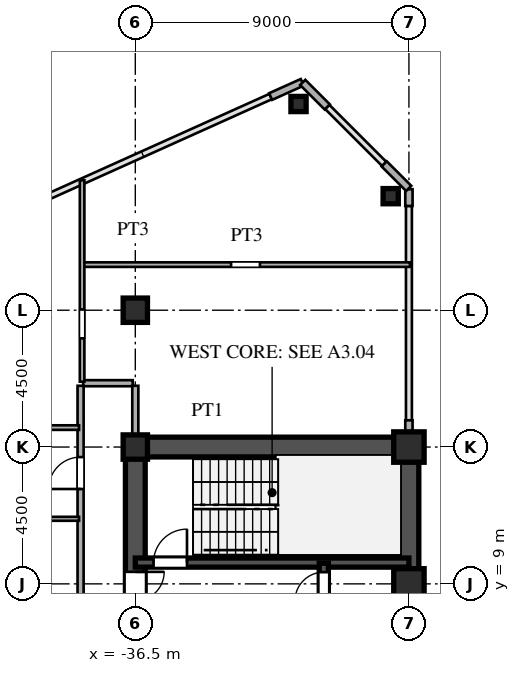
"""IFC4 building model, lengths in metres.
Left out: names, types, materials, properties, quantities, classifications, styles, units other than length and angle.
Written with IfcOpenShell. Run it as: python <this file> out.ifc"""

import sys

from ifc_helpers import new_model, si_unit, direction, frame, frame_2d, origin, origin_2d, place, context, subcontext, project, spatial, rectangle, hollow_rectangle, i_section, extrude, source, transform, mapped, element, fill, save


model = new_model("IFC4")
c1 = context("Model", 3, precision=1e-05, world=origin(), true_north=direction((0.0, 1.0)))
c2 = subcontext(c1, "Body", "Model", "MODEL_VIEW")
j1 = project(units=[si_unit("LENGTHUNIT", "METRE"), si_unit("PLANEANGLEUNIT", "RADIAN")], contexts=[c1])
p1 = place(None, origin())
s1 = spatial("IfcSite", under=j1, at=p1, CompositionType="ELEMENT")
p2 = place(p1, origin())
s2 = spatial("IfcBuilding", under=s1, at=p2, CompositionType="ELEMENT")
p3 = place(p2, frame((0.0, 0.0, 96.0)))
s3 = spatial("IfcBuildingStorey", under=s2, at=p3, CompositionType="ELEMENT", Elevation=96.0)
m1 = source(origin(), c2, "Body", "SweptSolid", [
    extrude(hollow_rectangle(XDim=1.0, YDim=1.0, WallThickness=0.042, at=origin_2d()), origin(), (0.0, 0.0, 1.0), 3.6),
])
for number, where, z_axis, x_axis in (
    (1, (-27.5, 9.0, 0.0), (0.0, 0.0, 1.0), (1.0, 0.0, 0.0)),
    (2, (-27.5, 13.5, 0.0), (0.0, 0.0, 1.0), (1.0, 0.0, 0.0)),
):
    element("IfcColumn", number, at=place(p3, frame(where, z_axis=z_axis, x_axis=x_axis)), inside=s3, PredefinedType="COLUMN", context=c2, shape_type="MappedRepresentation", body=[
        mapped(m1, transform((0.0, 0.0, 0.0), scale=1.0)),
    ])
m2 = source(origin(), c2, "Body", "SweptSolid", [
    extrude(i_section(OverallWidth=0.8, OverallDepth=0.8, WebThickness=0.032, FlangeThickness=0.05, at=origin_2d()), origin(), (0.0, 0.0, 1.0), 3.6),
])
for number, where, z_axis, x_axis in (
    (3, (-36.5, 13.5, 0.0), (0.0, 0.0, 1.0), (1.0, 0.0, 0.0)),
    (4, (-36.5, 18.0, 0.0), (0.0, 0.0, 1.0), (1.0, 0.0, 0.0)),
):
    element("IfcColumn", number, at=place(p3, frame(where, z_axis=z_axis, x_axis=x_axis)), inside=s3, PredefinedType="COLUMN", context=c2, shape_type="MappedRepresentation", body=[
        mapped(m2, transform((0.0, 0.0, 0.0), scale=1.0)),
    ])
m3 = source(origin(), c2, "Body", "SweptSolid", [
    extrude(hollow_rectangle(XDim=0.5, YDim=0.5, WallThickness=0.02, at=origin_2d()), origin(), (0.0, 0.0, 1.0), 3.6),
])
for number, where, z_axis, x_axis in (
    (5, (-28.1, 21.751, 0.0), (0.0, 0.0, 1.0), (1.0, 0.0, 0.0)),
    (6, (-31.131, 24.783, 0.0), (0.0, 0.0, 1.0), (1.0, 0.0, 0.0)),
):
    element("IfcColumn", number, at=place(p3, frame(where, z_axis=z_axis, x_axis=x_axis)), inside=s3, PredefinedType="COLUMN", context=c2, shape_type="MappedRepresentation", body=[
        mapped(m3, transform((0.0, 0.0, 0.0), scale=1.0)),
    ])
p4 = place(p3, frame((-27.5, 13.83, 0.0), z_axis=(0.0, 0.0, 1.0), x_axis=(0.0, 1.0, 0.0)))
e7 = element("IfcWall", 7, at=p4, inside=s3, PredefinedType="SOLIDWALL", context=c2, shape_type="SweptSolid", body=[
    extrude(rectangle(XDim=0.55, YDim=0.24, at=frame_2d((0.275, 0.0))), origin(), (0.0, 0.0, 1.0), 2.88),
])
p5 = place(p3, frame((-27.5, 21.43, 0.0), z_axis=(0.0, 0.0, 1.0), x_axis=(0.0, 1.0, 0.0)))
e8 = element("IfcWall", 8, at=p5, inside=s3, PredefinedType="SOLIDWALL", context=c2, shape_type="SweptSolid", body=[
    extrude(rectangle(XDim=0.55, YDim=0.24, at=frame_2d((0.275, 0.0))), origin(), (0.0, 0.0, 1.0), 3.38),
])
for number, where, z_axis, x_axis in (
    (9, (-27.507, 22.007, 0.0), (0.0, 0.0, 1.0), (-0.707, 0.707, 0.0)),
    (10, (-30.187, 24.687, 0.0), (0.0, 0.0, 1.0), (-0.707, 0.707, 0.0)),
):
    element("IfcWall", number, at=place(p3, frame(where, z_axis=z_axis, x_axis=x_axis)), inside=s3, PredefinedType="SOLIDWALL", context=c2, shape_type="SweptSolid", body=[
        extrude(rectangle(XDim=1.14, YDim=0.24, at=frame_2d((0.57, 0.0))), origin(), (0.0, 0.0, 1.0), 3.38),
    ])
p6 = place(p3, frame((-31.009, 25.496, 0.0), z_axis=(0.0, 0.0, 1.0), x_axis=(-0.911929519623, -0.410346866979, 0.0)))
e11 = element("IfcWall", 11, at=p6, inside=s3, PredefinedType="SOLIDWALL", context=c2, shape_type="SweptSolid", body=[
    extrude(rectangle(XDim=1.14, YDim=0.24, at=frame_2d((0.57, 0.0))), origin(), (0.0, 0.0, 1.0), 3.38),
])
p7 = place(p3, frame((-27.5, 1.3, 0.0), z_axis=(0.0, 0.0, 1.0), x_axis=(0.0, 1.0, 0.0)))
e12 = element("IfcWall", 12, at=p7, inside=s3, PredefinedType="SHEAR", context=c2, shape_type="SweptSolid", body=[
    extrude(rectangle(XDim=12.2, YDim=0.65, at=frame_2d((6.1, 0.0))), origin(), (0.0, 0.0, 1.0), 3.38),
])
p8 = place(p3, frame((-36.5, 13.5, 0.0), z_axis=(0.0, 0.0, 1.0), x_axis=(1.0, 0.0, 0.0)))
e13 = element("IfcWall", 13, at=p8, inside=s3, PredefinedType="SHEAR", context=c2, shape_type="SweptSolid", body=[
    extrude(rectangle(XDim=9.0, YDim=0.65, at=frame_2d((4.5, 0.0))), origin(), (0.0, 0.0, 1.0), 3.38),
])
p9 = place(p3, frame((-36.5, 8.2, 0.0), z_axis=(0.0, 0.0, 1.0), x_axis=(0.0, 1.0, 0.0)))
e14 = element("IfcWall", 14, at=p9, inside=s3, PredefinedType="SHEAR", context=c2, shape_type="SweptSolid", body=[
    extrude(rectangle(XDim=5.45, YDim=0.65, at=frame_2d((2.725, 0.0))), origin(), (0.0, 0.0, 1.0), 3.38),
])
p10 = place(p9, frame((0.245, 0.0, 0.0)))
e15 = element("IfcOpeningElement", 15, at=p10, cuts=e14, PredefinedType="OPENING", context=c2, shape_type="SweptSolid", body=[
    extrude(rectangle(XDim=0.95, YDim=2.15, at=frame_2d((0.475, 1.075))), frame((0.0, 0.335, 0.0), z_axis=(0.0, -1.0, 0.0), x_axis=(1.0, 0.0, 0.0)), (0.0, 0.0, 1.0), 0.67),
])
p11 = place(p3, frame((-36.5, 9.7, 0.0), z_axis=(0.0, 0.0, 1.0), x_axis=(1.0, 0.0, 0.0)))
e16 = element("IfcWall", 16, at=p11, inside=s3, PredefinedType="SHEAR", context=c2, shape_type="SweptSolid", body=[
    extrude(rectangle(XDim=9.0, YDim=0.3, at=frame_2d((4.5, 0.0))), origin(), (0.0, 0.0, 1.0), 3.38),
])
p12 = place(p11, frame((0.6, 0.0, 0.0)))
e17 = element("IfcOpeningElement", 17, at=p12, cuts=e16, PredefinedType="OPENING", context=c2, shape_type="SweptSolid", body=[
    extrude(rectangle(XDim=1.1, YDim=2.2, at=frame_2d((0.55, 1.1))), frame((0.0, 0.16, 0.0), z_axis=(0.0, -1.0, 0.0), x_axis=(1.0, 0.0, 0.0)), (0.0, 0.0, 1.0), 0.32),
])
p13 = place(p3, frame((-30.3, 8.15, 0.0), z_axis=(0.0, 0.0, 1.0), x_axis=(0.0, 1.0, 0.0)))
e18 = element("IfcWall", 18, at=p13, inside=s3, PredefinedType="SHEAR", context=c2, shape_type="SweptSolid", body=[
    extrude(rectangle(XDim=1.53, YDim=0.3, at=frame_2d((0.765, 0.0))), origin(), (0.0, 0.0, 1.0), 3.38),
])
p14 = place(p13, frame((0.285, 0.0, 0.0)))
e19 = element("IfcOpeningElement", 19, at=p14, cuts=e18, PredefinedType="OPENING", context=c2, shape_type="SweptSolid", body=[
    extrude(rectangle(XDim=0.95, YDim=2.15, at=frame_2d((0.475, 1.075))), frame((0.0, 0.16, 0.0), z_axis=(0.0, -1.0, 0.0), x_axis=(1.0, 0.0, 0.0)), (0.0, 0.0, 1.0), 0.32),
])
p15 = place(p3, frame((-44.1, 11.14, 0.0), z_axis=(0.0, 0.0, 1.0), x_axis=(1.0, 0.0, 0.0)))
e20 = element("IfcWall", 20, at=p15, inside=s3, PredefinedType="PARTITIONING", context=c2, shape_type="SweptSolid", body=[
    extrude(rectangle(XDim=5.75, YDim=0.13, at=frame_2d((2.875, 0.0))), origin(), (0.0, 0.0, 1.0), 3.38),
])
p16 = place(p15, frame((2.435, 0.0, 0.0)))
e21 = element("IfcOpeningElement", 21, at=p16, cuts=e20, PredefinedType="OPENING", context=c2, shape_type="SweptSolid", body=[
    extrude(rectangle(XDim=0.88, YDim=2.1, at=frame_2d((0.44, 1.05))), frame((0.0, 0.075, 0.0), z_axis=(0.0, -1.0, 0.0), x_axis=(1.0, 0.0, 0.0)), (0.0, 0.0, 1.0), 0.15),
])
p17 = place(p3, frame((-44.1, 14.14, 0.0), z_axis=(0.0, 0.0, 1.0), x_axis=(1.0, 0.0, 0.0)))
e22 = element("IfcWall", 22, at=p17, inside=s3, PredefinedType="PARTITIONING", context=c2, shape_type="SweptSolid", body=[
    extrude(rectangle(XDim=5.75, YDim=0.15, at=frame_2d((2.875, 0.0))), origin(), (0.0, 0.0, 1.0), 3.38),
])
p18 = place(p17, frame((2.4, 0.0, 0.0)))
e23 = element("IfcOpeningElement", 23, at=p18, cuts=e22, PredefinedType="OPENING", context=c2, shape_type="SweptSolid", body=[
    extrude(rectangle(XDim=0.95, YDim=2.15, at=frame_2d((0.475, 1.075))), frame((0.0, 0.085, 0.0), z_axis=(0.0, -1.0, 0.0), x_axis=(1.0, 0.0, 0.0)), (0.0, 0.0, 1.0), 0.17),
])
p19 = place(p3, frame((-38.215, 15.6, 0.0), z_axis=(0.0, 0.0, 1.0), x_axis=(1.0, 0.0, 0.0)))
e24 = element("IfcWall", 24, at=p19, inside=s3, PredefinedType="PARTITIONING", context=c2, shape_type="SweptSolid", body=[
    extrude(rectangle(XDim=1.63, YDim=0.2, at=frame_2d((0.815, 0.0))), origin(), (0.0, 0.0, 1.0), 3.38),
])
p20 = place(p3, frame((-38.2, 19.5, 0.0), z_axis=(0.0, 0.0, 1.0), x_axis=(1.0, 0.0, 0.0)))
e25 = element("IfcWall", 25, at=p20, inside=s3, PredefinedType="PARTITIONING", context=c2, shape_type="SweptSolid", body=[
    extrude(rectangle(XDim=10.735, YDim=0.15, at=frame_2d((5.367, 0.0))), origin(), (0.0, 0.0, 1.0), 3.38),
])
p21 = place(p20, frame((4.85, 0.0, 0.0)))
e26 = element("IfcOpeningElement", 26, at=p21, cuts=e25, PredefinedType="OPENING", context=c2, shape_type="SweptSolid", body=[
    extrude(rectangle(XDim=0.95, YDim=2.15, at=frame_2d((0.475, 1.075))), frame((0.0, 0.085, 0.0), z_axis=(0.0, -1.0, 0.0), x_axis=(1.0, 0.0, 0.0)), (0.0, 0.0, 1.0), 0.17),
])
p22 = place(p3, frame((-38.3, -15.515, 0.0), z_axis=(0.0, 0.0, 1.0), x_axis=(0.0, 1.0, 0.0)))
e27 = element("IfcWall", 27, at=p22, inside=s3, PredefinedType="PARTITIONING", context=c2, shape_type="SweptSolid", body=[
    extrude(rectangle(XDim=31.03, YDim=0.2, at=frame_2d((15.515, 0.0))), origin(), (0.0, 0.0, 1.0), 3.38),
])
p23 = place(p22, frame((0.79, 0.0, 0.0)))
e28 = element("IfcOpeningElement", 28, at=p23, cuts=e27, PredefinedType="OPENING", context=c2, shape_type="SweptSolid", body=[
    extrude(rectangle(XDim=1.05, YDim=2.25, at=frame_2d((0.525, 1.125))), frame((0.0, 0.11, 0.0), z_axis=(0.0, -1.0, 0.0), x_axis=(1.0, 0.0, 0.0)), (0.0, 0.0, 1.0), 0.22),
])
p24 = place(p22, frame((7.186, 0.0, 0.0)))
e29 = element("IfcOpeningElement", 29, at=p24, cuts=e27, PredefinedType="OPENING", context=c2, shape_type="SweptSolid", body=[
    extrude(rectangle(XDim=1.05, YDim=2.25, at=frame_2d((0.525, 1.125))), frame((0.0, 0.11, 0.0), z_axis=(0.0, -1.0, 0.0), x_axis=(1.0, 0.0, 0.0)), (0.0, 0.0, 1.0), 0.22),
])
p25 = place(p22, frame((17.825, 0.0, 0.0)))
e30 = element("IfcOpeningElement", 30, at=p25, cuts=e27, PredefinedType="OPENING", context=c2, shape_type="SweptSolid", body=[
    extrude(rectangle(XDim=1.05, YDim=2.25, at=frame_2d((0.525, 1.125))), frame((0.0, 0.11, 0.0), z_axis=(0.0, -1.0, 0.0), x_axis=(1.0, 0.0, 0.0)), (0.0, 0.0, 1.0), 0.22),
])
p26 = place(p22, frame((27.635, 0.0, 0.0)))
e31 = element("IfcOpeningElement", 31, at=p26, cuts=e27, PredefinedType="OPENING", context=c2, shape_type="SweptSolid", body=[
    extrude(rectangle(XDim=1.05, YDim=2.25, at=frame_2d((0.525, 1.125))), frame((0.0, 0.11, 0.0), z_axis=(0.0, -1.0, 0.0), x_axis=(1.0, 0.0, 0.0)), (0.0, 0.0, 1.0), 0.22),
])
p27 = place(p3, frame((-38.25, 15.65, 0.0), z_axis=(0.0, 0.0, 1.0), x_axis=(0.0, 1.0, 0.0)))
e32 = element("IfcWall", 32, at=p27, inside=s3, PredefinedType="PARTITIONING", context=c2, shape_type="SweptSolid", body=[
    extrude(rectangle(XDim=6.623, YDim=0.15, at=frame_2d((3.312, 0.0))), origin(), (0.0, 0.0, 1.0), 3.38),
])
p28 = place(p27, frame((1.425, 0.0, 0.0)))
e33 = element("IfcOpeningElement", 33, at=p28, cuts=e32, PredefinedType="OPENING", context=c2, shape_type="SweptSolid", body=[
    extrude(rectangle(XDim=0.95, YDim=2.15, at=frame_2d((0.475, 1.075))), frame((0.0, 0.085, 0.0), z_axis=(0.0, -1.0, 0.0), x_axis=(1.0, 0.0, 0.0)), (0.0, 0.0, 1.0), 0.17),
])
p29 = place(p3, frame((-36.5, 13.83, 0.0), z_axis=(0.0, 0.0, 1.0), x_axis=(0.0, 1.0, 0.0)))
e34 = element("IfcWall", 34, at=p29, inside=s3, PredefinedType="PARTITIONING", context=c2, shape_type="SweptSolid", body=[
    extrude(rectangle(XDim=1.685, YDim=0.2, at=frame_2d((0.842, 0.0))), origin(), (0.0, 0.0, 1.0), 2.68),
])
m4 = source(origin(), c2, "Body", "SweptSolid", [
    extrude(rectangle(XDim=0.95, YDim=2.15, at=frame_2d((0.475, 1.075))), frame((0.0, 0.025, 0.0), z_axis=(0.0, -1.0, 0.0), x_axis=(1.0, 0.0, 0.0)), (0.0, 0.0, 1.0), 0.05),
])
p30 = place(p10, frame((0.95, 0.0, 0.0), z_axis=(0.0, 0.0, 1.0), x_axis=(-1.0, 0.0, 0.0)))
e35 = element("IfcDoor", 35, at=p30, inside=s3, OperationType="SINGLE_SWING_RIGHT", PredefinedType="DOOR", context=c2, shape_type="MappedRepresentation", body=[
    mapped(m4, transform((0.0, 0.0, 0.0), scale=1.0)),
])
fill(e15, e35)
m5 = source(origin(), c2, "Body", "SweptSolid", [
    extrude(rectangle(XDim=1.1, YDim=2.2, at=frame_2d((0.55, 1.1))), frame((0.0, 0.025, 0.0), z_axis=(0.0, -1.0, 0.0), x_axis=(1.0, 0.0, 0.0)), (0.0, 0.0, 1.0), 0.05),
])
p31 = place(p12, origin())
e36 = element("IfcDoor", 36, at=p31, inside=s3, OperationType="SINGLE_SWING_RIGHT", PredefinedType="DOOR", context=c2, shape_type="MappedRepresentation", body=[
    mapped(m5, transform((0.0, 0.0, 0.0), scale=1.0)),
])
fill(e17, e36)
p32 = place(p14, origin())
e37 = element("IfcDoor", 37, at=p32, inside=s3, OperationType="SINGLE_SWING_LEFT", PredefinedType="DOOR", context=c2, shape_type="MappedRepresentation", body=[
    mapped(m4, transform((0.0, 0.0, 0.0), scale=1.0)),
])
fill(e19, e37)
m6 = source(origin(), c2, "Body", "SweptSolid", [
    extrude(rectangle(XDim=1.05, YDim=2.25, at=frame_2d((0.525, 1.125))), frame((0.0, 0.025, 0.0), z_axis=(0.0, -1.0, 0.0), x_axis=(1.0, 0.0, 0.0)), (0.0, 0.0, 1.0), 0.05),
])
p33 = place(p26, origin())
e38 = element("IfcDoor", 38, at=p33, inside=s3, OperationType="SINGLE_SWING_LEFT", PredefinedType="DOOR", context=c2, shape_type="MappedRepresentation", body=[
    mapped(m6, transform((0.0, 0.0, 0.0), scale=1.0)),
])
fill(e31, e38)
save(model, sys.argv[1])
